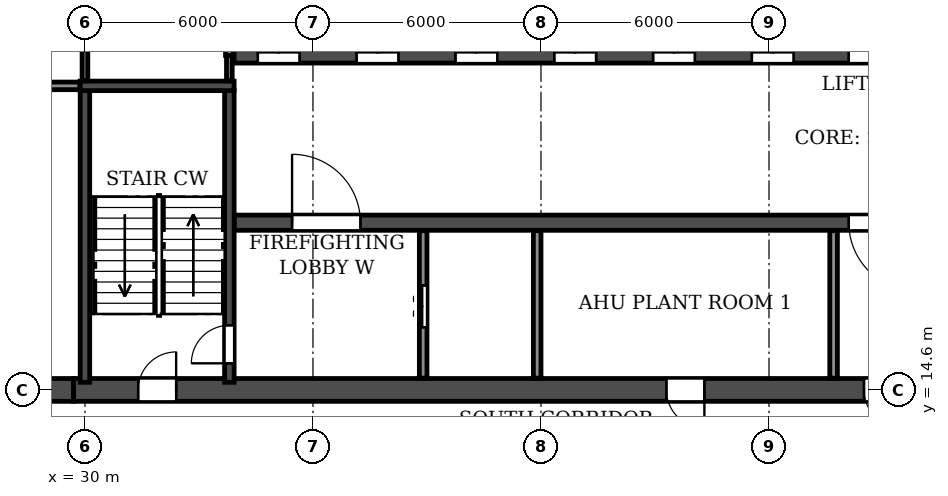
"""IFC4 building model, lengths in metres.
Left out: names, types, materials, properties, quantities, classifications, styles, units other than length and angle.
Written with IfcOpenShell. Run it as: python <this file> out.ifc"""

import sys

from ifc_helpers import new_model, si_unit, direction, frame, frame_2d, origin, place, context, subcontext, project, spatial, rectangle, extrude, element, fill, save


model = new_model("IFC4")
c1 = context("Model", 3, precision=1e-05, world=origin(), true_north=direction((0.0, 1.0)))
c2 = subcontext(c1, "Body", "Model", "MODEL_VIEW")
j1 = project(units=[si_unit("LENGTHUNIT", "METRE"), si_unit("PLANEANGLEUNIT", "RADIAN")], contexts=[c1])
p1 = place(None, origin())
s1 = spatial("IfcSite", under=j1, at=p1, CompositionType="ELEMENT")
p2 = place(p1, origin())
s2 = spatial("IfcBuilding", under=s1, at=p2, CompositionType="ELEMENT")
p3 = place(p2, frame((0.0, 0.0, 214.8)))
s3 = spatial("IfcBuildingStorey", under=s2, at=p3, CompositionType="ELEMENT", Elevation=214.8)
p4 = place(p3, frame((24.9, 14.6, 0.0), z_axis=(0.0, 0.0, 1.0), x_axis=(1.0, 0.0, 0.0)))
e1 = element("IfcWall", 1, at=p4, inside=s3, PredefinedType="SHEAR", context=c2, shape_type="SweptSolid", body=[
    extrude(rectangle(XDim=4.8, YDim=0.6, at=frame_2d((2.4, 0.0))), origin(), (0.0, 0.0, 1.0), 6.38),
])
p5 = place(p4, frame((1.9, 0.0, 0.0)))
e2 = element("IfcOpeningElement", 2, at=p5, cuts=e1, PredefinedType="OPENING", context=c2, shape_type="SweptSolid", body=[
    extrude(rectangle(XDim=1.0, YDim=2.1, at=frame_2d((0.5, 1.05))), frame((0.0, 0.31, 0.0), z_axis=(0.0, -1.0, 0.0), x_axis=(1.0, 0.0, 0.0)), (0.0, 0.0, 1.0), 0.62),
])
p6 = place(p3, frame((29.7, 14.6, 0.0), z_axis=(0.0, 0.0, 1.0), x_axis=(1.0, 0.0, 0.0)))
e3 = element("IfcWall", 3, at=p6, inside=s3, PredefinedType="SOLIDWALL", context=c2, shape_type="SweptSolid", body=[
    extrude(rectangle(XDim=42.6, YDim=0.6, at=frame_2d((21.3, 0.0))), origin(), (0.0, 0.0, 1.0), 6.38),
])
p7 = place(p6, frame((1.7, 0.0, 0.0)))
e4 = element("IfcOpeningElement", 4, at=p7, cuts=e3, PredefinedType="OPENING", context=c2, shape_type="SweptSolid", body=[
    extrude(rectangle(XDim=1.0, YDim=2.1, at=frame_2d((0.5, 1.05))), frame((0.0, 0.31, 0.0), z_axis=(0.0, -1.0, 0.0), x_axis=(1.0, 0.0, 0.0)), (0.0, 0.0, 1.0), 0.62),
])
p8 = place(p6, frame((15.6, 0.0, 0.0)))
e5 = element("IfcOpeningElement", 5, at=p8, cuts=e3, PredefinedType="OPENING", context=c2, shape_type="SweptSolid", body=[
    extrude(rectangle(XDim=1.0, YDim=2.1, at=frame_2d((0.5, 1.05))), frame((0.0, 0.31, 0.0), z_axis=(0.0, -1.0, 0.0), x_axis=(1.0, 0.0, 0.0)), (0.0, 0.0, 1.0), 0.62),
])
p9 = place(p6, frame((20.8, 0.0, 0.0)))
e6 = element("IfcOpeningElement", 6, at=p9, cuts=e3, PredefinedType="OPENING", context=c2, shape_type="SweptSolid", body=[
    extrude(rectangle(XDim=1.0, YDim=2.1, at=frame_2d((0.5, 1.05))), frame((0.0, 0.31, 0.0), z_axis=(0.0, -1.0, 0.0), x_axis=(1.0, 0.0, 0.0)), (0.0, 0.0, 1.0), 0.62),
])
p10 = place(p6, frame((25.75, 0.0, 0.0)))
e7 = element("IfcOpeningElement", 7, at=p10, cuts=e3, PredefinedType="OPENING", context=c2, shape_type="SweptSolid", body=[
    extrude(rectangle(XDim=1.5, YDim=2.1, at=frame_2d((0.75, 1.05))), frame((0.0, 0.31, 0.0), z_axis=(0.0, -1.0, 0.0), x_axis=(1.0, 0.0, 0.0)), (0.0, 0.0, 1.0), 0.62),
])
p11 = place(p6, frame((39.9, 0.0, 0.0)))
e8 = element("IfcOpeningElement", 8, at=p11, cuts=e3, PredefinedType="OPENING", context=c2, shape_type="SweptSolid", body=[
    extrude(rectangle(XDim=1.0, YDim=2.1, at=frame_2d((0.5, 1.05))), frame((0.0, 0.31, 0.0), z_axis=(0.0, -1.0, 0.0), x_axis=(1.0, 0.0, 0.0)), (0.0, 0.0, 1.0), 0.62),
])
p12 = place(p3, frame((33.925, 19.0, 0.0), z_axis=(0.0, 0.0, 1.0), x_axis=(1.0, 0.0, 0.0)))
e9 = element("IfcWall", 9, at=p12, inside=s3, PredefinedType="SOLIDWALL", context=c2, shape_type="SweptSolid", body=[
    extrude(rectangle(XDim=34.15, YDim=0.4, at=frame_2d((17.075, 0.0))), origin(), (0.0, 0.0, 1.0), 6.38),
])
p13 = place(p12, frame((16.175, 0.0, 0.0)))
e10 = element("IfcOpeningElement", 10, at=p13, cuts=e9, PredefinedType="OPENING", context=c2, shape_type="SweptSolid", body=[
    extrude(rectangle(XDim=1.8, YDim=2.1, at=frame_2d((0.9, 1.05))), frame((0.0, 0.21, 0.0), z_axis=(0.0, -1.0, 0.0), x_axis=(1.0, 0.0, 0.0)), (0.0, 0.0, 1.0), 0.42),
])
p14 = place(p12, frame((1.525, 0.0, 0.0)))
e11 = element("IfcOpeningElement", 11, at=p14, cuts=e9, PredefinedType="OPENING", context=c2, shape_type="SweptSolid", body=[
    extrude(rectangle(XDim=1.8, YDim=2.1, at=frame_2d((0.9, 1.05))), frame((0.0, 0.21, 0.0), z_axis=(0.0, -1.0, 0.0), x_axis=(1.0, 0.0, 0.0)), (0.0, 0.0, 1.0), 0.42),
])
p15 = place(p12, frame((30.825, 0.0, 0.0)))
e12 = element("IfcOpeningElement", 12, at=p15, cuts=e9, PredefinedType="OPENING", context=c2, shape_type="SweptSolid", body=[
    extrude(rectangle(XDim=1.8, YDim=2.1, at=frame_2d((0.9, 1.05))), frame((0.0, 0.21, 0.0), z_axis=(0.0, -1.0, 0.0), x_axis=(1.0, 0.0, 0.0)), (0.0, 0.0, 1.0), 0.42),
])
p16 = place(p3, frame((33.925, 23.4, 0.0), z_axis=(0.0, 0.0, 1.0), x_axis=(1.0, 0.0, 0.0)))
e13 = element("IfcWall", 13, at=p16, inside=s3, PredefinedType="SOLIDWALL", context=c2, shape_type="SweptSolid", body=[
    extrude(rectangle(XDim=34.15, YDim=0.4, at=frame_2d((17.075, 0.0))), origin(), (0.0, 0.0, 1.0), 6.38),
])
p17 = place(p16, frame((16.175, 0.0, 0.0)))
e14 = element("IfcOpeningElement", 14, at=p17, cuts=e13, PredefinedType="OPENING", context=c2, shape_type="SweptSolid", body=[
    extrude(rectangle(XDim=1.8, YDim=2.1, at=frame_2d((0.9, 1.05))), frame((0.0, 0.21, 0.0), z_axis=(0.0, -1.0, 0.0), x_axis=(1.0, 0.0, 0.0)), (0.0, 0.0, 1.0), 0.42),
])
p18 = place(p16, frame((0.625, 0.0, 0.0)))
e15 = element("IfcOpeningElement", 15, at=p18, cuts=e13, PredefinedType="OPENING", context=c2, shape_type="SweptSolid", body=[
    extrude(rectangle(XDim=1.1, YDim=2.1, at=frame_2d((0.55, 1.05))), frame((0.0, 0.21, 0.0), z_axis=(0.0, -1.0, 0.0), x_axis=(1.0, 0.0, 0.0)), (0.0, 0.0, 1.0), 0.42),
])
p19 = place(p16, frame((3.225, 0.0, 0.0)))
e16 = element("IfcOpeningElement", 16, at=p19, cuts=e13, PredefinedType="OPENING", context=c2, shape_type="SweptSolid", body=[
    extrude(rectangle(XDim=1.1, YDim=2.1, at=frame_2d((0.55, 1.05))), frame((0.0, 0.21, 0.0), z_axis=(0.0, -1.0, 0.0), x_axis=(1.0, 0.0, 0.0)), (0.0, 0.0, 1.0), 0.42),
])
p20 = place(p16, frame((5.825, 0.0, 0.0)))
e17 = element("IfcOpeningElement", 17, at=p20, cuts=e13, PredefinedType="OPENING", context=c2, shape_type="SweptSolid", body=[
    extrude(rectangle(XDim=1.1, YDim=2.1, at=frame_2d((0.55, 1.05))), frame((0.0, 0.21, 0.0), z_axis=(0.0, -1.0, 0.0), x_axis=(1.0, 0.0, 0.0)), (0.0, 0.0, 1.0), 0.42),
])
p21 = place(p16, frame((8.425, 0.0, 0.0)))
e18 = element("IfcOpeningElement", 18, at=p21, cuts=e13, PredefinedType="OPENING", context=c2, shape_type="SweptSolid", body=[
    extrude(rectangle(XDim=1.1, YDim=2.1, at=frame_2d((0.55, 1.05))), frame((0.0, 0.21, 0.0), z_axis=(0.0, -1.0, 0.0), x_axis=(1.0, 0.0, 0.0)), (0.0, 0.0, 1.0), 0.42),
])
p22 = place(p16, frame((11.025, 0.0, 0.0)))
e19 = element("IfcOpeningElement", 19, at=p22, cuts=e13, PredefinedType="OPENING", context=c2, shape_type="SweptSolid", body=[
    extrude(rectangle(XDim=1.1, YDim=2.1, at=frame_2d((0.55, 1.05))), frame((0.0, 0.21, 0.0), z_axis=(0.0, -1.0, 0.0), x_axis=(1.0, 0.0, 0.0)), (0.0, 0.0, 1.0), 0.42),
])
p23 = place(p16, frame((13.625, 0.0, 0.0)))
e20 = element("IfcOpeningElement", 20, at=p23, cuts=e13, PredefinedType="OPENING", context=c2, shape_type="SweptSolid", body=[
    extrude(rectangle(XDim=1.1, YDim=2.1, at=frame_2d((0.55, 1.05))), frame((0.0, 0.21, 0.0), z_axis=(0.0, -1.0, 0.0), x_axis=(1.0, 0.0, 0.0)), (0.0, 0.0, 1.0), 0.42),
])
p24 = place(p16, frame((27.225, 0.0, 0.0)))
e21 = element("IfcOpeningElement", 21, at=p24, cuts=e13, PredefinedType="OPENING", context=c2, shape_type="SweptSolid", body=[
    extrude(rectangle(XDim=1.1, YDim=2.1, at=frame_2d((0.55, 1.05))), frame((0.0, 0.21, 0.0), z_axis=(0.0, -1.0, 0.0), x_axis=(1.0, 0.0, 0.0)), (0.0, 0.0, 1.0), 0.42),
])
p25 = place(p3, frame((30.0, 14.8, 0.0), z_axis=(0.0, 0.0, 1.0), x_axis=(0.0, 1.0, 0.0)))
e22 = element("IfcWall", 22, at=p25, inside=s3, PredefinedType="SOLIDWALL", context=c2, shape_type="SweptSolid", body=[
    extrude(rectangle(XDim=7.675, YDim=0.25, at=frame_2d((3.837, 0.0))), origin(), (0.0, 0.0, 1.0), 6.38),
])
p26 = place(p3, frame((33.8, 14.8, 0.0), z_axis=(0.0, 0.0, 1.0), x_axis=(0.0, 1.0, 0.0)))
e23 = element("IfcWall", 23, at=p26, inside=s3, PredefinedType="SOLIDWALL", context=c2, shape_type="SweptSolid", body=[
    extrude(rectangle(XDim=7.675, YDim=0.25, at=frame_2d((3.837, 0.0))), origin(), (0.0, 0.0, 1.0), 6.38),
])
p27 = place(p26, frame((0.5, 0.0, 0.0)))
e24 = element("IfcOpeningElement", 24, at=p27, cuts=e23, PredefinedType="OPENING", context=c2, shape_type="SweptSolid", body=[
    extrude(rectangle(XDim=1.0, YDim=2.1, at=frame_2d((0.5, 1.05))), frame((0.0, 0.135, 0.0), z_axis=(0.0, -1.0, 0.0), x_axis=(1.0, 0.0, 0.0)), (0.0, 0.0, 1.0), 0.27),
])
p28 = place(p3, frame((29.875, 22.6, 0.0), z_axis=(0.0, 0.0, 1.0), x_axis=(1.0, 0.0, 0.0)))
e25 = element("IfcWall", 25, at=p28, inside=s3, PredefinedType="SOLIDWALL", context=c2, shape_type="SweptSolid", body=[
    extrude(rectangle(XDim=4.05, YDim=0.25, at=frame_2d((2.025, 0.0))), origin(), (0.0, 0.0, 1.0), 6.38),
])
p29 = place(p3, frame((49.7, 14.91, 0.0), z_axis=(0.0, 0.0, 1.0), x_axis=(0.0, 1.0, 0.0)))
e26 = element("IfcWall", 26, at=p29, inside=s3, PredefinedType="PARTITIONING", context=c2, shape_type="SweptSolid", body=[
    extrude(rectangle(XDim=3.88, YDim=0.2, at=frame_2d((1.94, 0.0))), origin(), (0.0, 0.0, 1.0), 6.38),
])
p30 = place(p3, frame((24.735, 22.6, 0.0), z_axis=(0.0, 0.0, 1.0), x_axis=(1.0, 0.0, 0.0)))
e27 = element("IfcWall", 27, at=p30, inside=s3, PredefinedType="PARTITIONING", context=c2, shape_type="SweptSolid", body=[
    extrude(rectangle(XDim=5.13, YDim=0.2, at=frame_2d((2.565, 0.0))), origin(), (0.0, 0.0, 1.0), 6.38),
])
p31 = place(p3, frame((30.0, 22.735, 0.0), z_axis=(0.0, 0.0, 1.0), x_axis=(0.0, 1.0, 0.0)))
e28 = element("IfcWall", 28, at=p31, inside=s3, PredefinedType="PARTITIONING", context=c2, shape_type="SweptSolid", body=[
    extrude(rectangle(XDim=4.755, YDim=0.15, at=frame_2d((2.377, 0.0))), origin(), (0.0, 0.0, 1.0), 6.38),
])
p32 = place(p3, frame((33.8, 22.735, 0.0), z_axis=(0.0, 0.0, 1.0), x_axis=(0.0, 1.0, 0.0)))
e29 = element("IfcWall", 29, at=p32, inside=s3, PredefinedType="PARTITIONING", context=c2, shape_type="SweptSolid", body=[
    extrude(rectangle(XDim=0.665, YDim=0.15, at=frame_2d((0.333, 0.0))), origin(), (0.0, 0.0, 1.0), 6.38),
])
p33 = place(p3, frame((33.8, 23.4, 0.0), z_axis=(0.0, 0.0, 1.0), x_axis=(0.0, 1.0, 0.0)))
e30 = element("IfcWall", 30, at=p33, inside=s3, PredefinedType="PARTITIONING", context=c2, shape_type="SweptSolid", body=[
    extrude(rectangle(XDim=2.7, YDim=0.2, at=frame_2d((1.35, 0.0))), origin(), (0.0, 0.0, 1.0), 6.38),
])
p34 = place(p3, frame((38.9, 14.91, 0.0), z_axis=(0.0, 0.0, 1.0), x_axis=(0.0, 1.0, 0.0)))
e31 = element("IfcWall", 31, at=p34, inside=s3, PredefinedType="PARTITIONING", context=c2, shape_type="SweptSolid", body=[
    extrude(rectangle(XDim=3.88, YDim=0.2, at=frame_2d((1.94, 0.0))), origin(), (0.0, 0.0, 1.0), 6.38),
])
p35 = place(p34, frame((1.34, 0.0, 0.0)))
e32 = element("IfcOpeningElement", 32, at=p35, cuts=e31, PredefinedType="OPENING", context=c2, shape_type="SweptSolid", body=[
    extrude(rectangle(XDim=1.1, YDim=2.1, at=frame_2d((0.55, 1.05))), frame((0.0, 0.11, 0.0), z_axis=(0.0, -1.0, 0.0), x_axis=(1.0, 0.0, 0.0)), (0.0, 0.0, 1.0), 0.22),
])
p36 = place(p3, frame((41.9, 14.91, 0.0), z_axis=(0.0, 0.0, 1.0), x_axis=(0.0, 1.0, 0.0)))
e33 = element("IfcWall", 33, at=p36, inside=s3, PredefinedType="PARTITIONING", context=c2, shape_type="SweptSolid", body=[
    extrude(rectangle(XDim=3.88, YDim=0.2, at=frame_2d((1.94, 0.0))), origin(), (0.0, 0.0, 1.0), 6.38),
])
p37 = place(p7, origin())
e34 = element("IfcDoor", 34, at=p37, inside=s3, OperationType="SINGLE_SWING_RIGHT", PredefinedType="DOOR", context=c2, shape_type="SweptSolid", body=[
    extrude(rectangle(XDim=1.0, YDim=2.1, at=frame_2d((0.5, 1.05))), frame((0.0, 0.025, 0.0), z_axis=(0.0, -1.0, 0.0), x_axis=(1.0, 0.0, 0.0)), (0.0, 0.0, 1.0), 0.05),
])
fill(e4, e34)
p38 = place(p8, frame((1.0, 0.0, 0.0), z_axis=(0.0, 0.0, 1.0), x_axis=(-1.0, 0.0, 0.0)))
e35 = element("IfcDoor", 35, at=p38, inside=s3, OperationType="SINGLE_SWING_LEFT", PredefinedType="DOOR", context=c2, shape_type="SweptSolid", body=[
    extrude(rectangle(XDim=1.0, YDim=2.1, at=frame_2d((0.5, 1.05))), frame((0.0, 0.025, 0.0), z_axis=(0.0, -1.0, 0.0), x_axis=(1.0, 0.0, 0.0)), (0.0, 0.0, 1.0), 0.05),
])
fill(e5, e35)
p39 = place(p9, frame((1.0, 0.0, 0.0), z_axis=(0.0, 0.0, 1.0), x_axis=(-1.0, 0.0, 0.0)))
e36 = element("IfcDoor", 36, at=p39, inside=s3, OperationType="SINGLE_SWING_LEFT", PredefinedType="DOOR", context=c2, shape_type="SweptSolid", body=[
    extrude(rectangle(XDim=1.0, YDim=2.1, at=frame_2d((0.5, 1.05))), frame((0.0, 0.025, 0.0), z_axis=(0.0, -1.0, 0.0), x_axis=(1.0, 0.0, 0.0)), (0.0, 0.0, 1.0), 0.05),
])
fill(e6, e36)
p40 = place(p27, origin())
e37 = element("IfcDoor", 37, at=p40, inside=s3, OperationType="SINGLE_SWING_LEFT", PredefinedType="DOOR", context=c2, shape_type="SweptSolid", body=[
    extrude(rectangle(XDim=1.0, YDim=2.1, at=frame_2d((0.5, 1.05))), frame((0.0, 0.025, 0.0), z_axis=(0.0, -1.0, 0.0), x_axis=(1.0, 0.0, 0.0)), (0.0, 0.0, 1.0), 0.05),
])
fill(e24, e37)
p41 = place(p35, origin())
e38 = element("IfcDoor", 38, at=p41, inside=s3, OperationType="DOUBLE_DOOR_SLIDING", PredefinedType="DOOR", context=c2, shape_type="SweptSolid", body=[
    extrude(rectangle(XDim=1.1, YDim=2.1, at=frame_2d((0.55, 1.05))), frame((0.0, 0.025, 0.0), z_axis=(0.0, -1.0, 0.0), x_axis=(1.0, 0.0, 0.0)), (0.0, 0.0, 1.0), 0.05),
])
fill(e32, e38)
p42 = place(p17, origin())
e39 = element("IfcDoor", 39, at=p42, inside=s3, OperationType="DOUBLE_DOOR_SINGLE_SWING", PredefinedType="DOOR", context=c2, shape_type="SweptSolid", body=[
    extrude(rectangle(XDim=1.8, YDim=2.1, at=frame_2d((0.9, 1.05))), frame((0.0, 0.025, 0.0), z_axis=(0.0, -1.0, 0.0), x_axis=(1.0, 0.0, 0.0)), (0.0, 0.0, 1.0), 0.05),
])
fill(e14, e39)
p43 = place(p13, frame((1.8, 0.0, 0.0), z_axis=(0.0, 0.0, 1.0), x_axis=(-1.0, 0.0, 0.0)))
e40 = element("IfcDoor", 40, at=p43, inside=s3, OperationType="DOUBLE_DOOR_SINGLE_SWING", PredefinedType="DOOR", context=c2, shape_type="SweptSolid", body=[
    extrude(rectangle(XDim=1.8, YDim=2.1, at=frame_2d((0.9, 1.05))), frame((0.0, 0.025, 0.0), z_axis=(0.0, -1.0, 0.0), x_axis=(1.0, 0.0, 0.0)), (0.0, 0.0, 1.0), 0.05),
])
fill(e10, e40)
p44 = place(p18, origin())
e41 = element("IfcDoor", 41, at=p44, inside=s3, OperationType="DOUBLE_DOOR_SLIDING", PredefinedType="DOOR", context=c2, shape_type="SweptSolid", body=[
    extrude(rectangle(XDim=1.1, YDim=2.1, at=frame_2d((0.55, 1.05))), frame((0.0, 0.025, 0.0), z_axis=(0.0, -1.0, 0.0), x_axis=(1.0, 0.0, 0.0)), (0.0, 0.0, 1.0), 0.05),
])
fill(e15, e41)
p45 = place(p14, origin())
e42 = element("IfcDoor", 42, at=p45, inside=s3, OperationType="DOUBLE_DOOR_SINGLE_SWING", PredefinedType="DOOR", context=c2, shape_type="SweptSolid", body=[
    extrude(rectangle(XDim=1.8, YDim=2.1, at=frame_2d((0.9, 1.05))), frame((0.0, 0.025, 0.0), z_axis=(0.0, -1.0, 0.0), x_axis=(1.0, 0.0, 0.0)), (0.0, 0.0, 1.0), 0.05),
])
fill(e11, e42)
p46 = place(p19, origin())
e43 = element("IfcDoor", 43, at=p46, inside=s3, OperationType="DOUBLE_DOOR_SLIDING", PredefinedType="DOOR", context=c2, shape_type="SweptSolid", body=[
    extrude(rectangle(XDim=1.1, YDim=2.1, at=frame_2d((0.55, 1.05))), frame((0.0, 0.025, 0.0), z_axis=(0.0, -1.0, 0.0), x_axis=(1.0, 0.0, 0.0)), (0.0, 0.0, 1.0), 0.05),
])
fill(e16, e43)
p47 = place(p20, origin())
e44 = element("IfcDoor", 44, at=p47, inside=s3, OperationType="DOUBLE_DOOR_SLIDING", PredefinedType="DOOR", context=c2, shape_type="SweptSolid", body=[
    extrude(rectangle(XDim=1.1, YDim=2.1, at=frame_2d((0.55, 1.05))), frame((0.0, 0.025, 0.0), z_axis=(0.0, -1.0, 0.0), x_axis=(1.0, 0.0, 0.0)), (0.0, 0.0, 1.0), 0.05),
])
fill(e17, e44)
p48 = place(p21, origin())
e45 = element("IfcDoor", 45, at=p48, inside=s3, OperationType="DOUBLE_DOOR_SLIDING", PredefinedType="DOOR", context=c2, shape_type="SweptSolid", body=[
    extrude(rectangle(XDim=1.1, YDim=2.1, at=frame_2d((0.55, 1.05))), frame((0.0, 0.025, 0.0), z_axis=(0.0, -1.0, 0.0), x_axis=(1.0, 0.0, 0.0)), (0.0, 0.0, 1.0), 0.05),
])
fill(e18, e45)
p49 = place(p22, origin())
e46 = element("IfcDoor", 46, at=p49, inside=s3, OperationType="DOUBLE_DOOR_SLIDING", PredefinedType="DOOR", context=c2, shape_type="SweptSolid", body=[
    extrude(rectangle(XDim=1.1, YDim=2.1, at=frame_2d((0.55, 1.05))), frame((0.0, 0.025, 0.0), z_axis=(0.0, -1.0, 0.0), x_axis=(1.0, 0.0, 0.0)), (0.0, 0.0, 1.0), 0.05),
])
fill(e19, e46)
p50 = place(p23, origin())
e47 = element("IfcDoor", 47, at=p50, inside=s3, OperationType="DOUBLE_DOOR_SLIDING", PredefinedType="DOOR", context=c2, shape_type="SweptSolid", body=[
    extrude(rectangle(XDim=1.1, YDim=2.1, at=frame_2d((0.55, 1.05))), frame((0.0, 0.025, 0.0), z_axis=(0.0, -1.0, 0.0), x_axis=(1.0, 0.0, 0.0)), (0.0, 0.0, 1.0), 0.05),
])
fill(e20, e47)
save(model, sys.argv[1])
